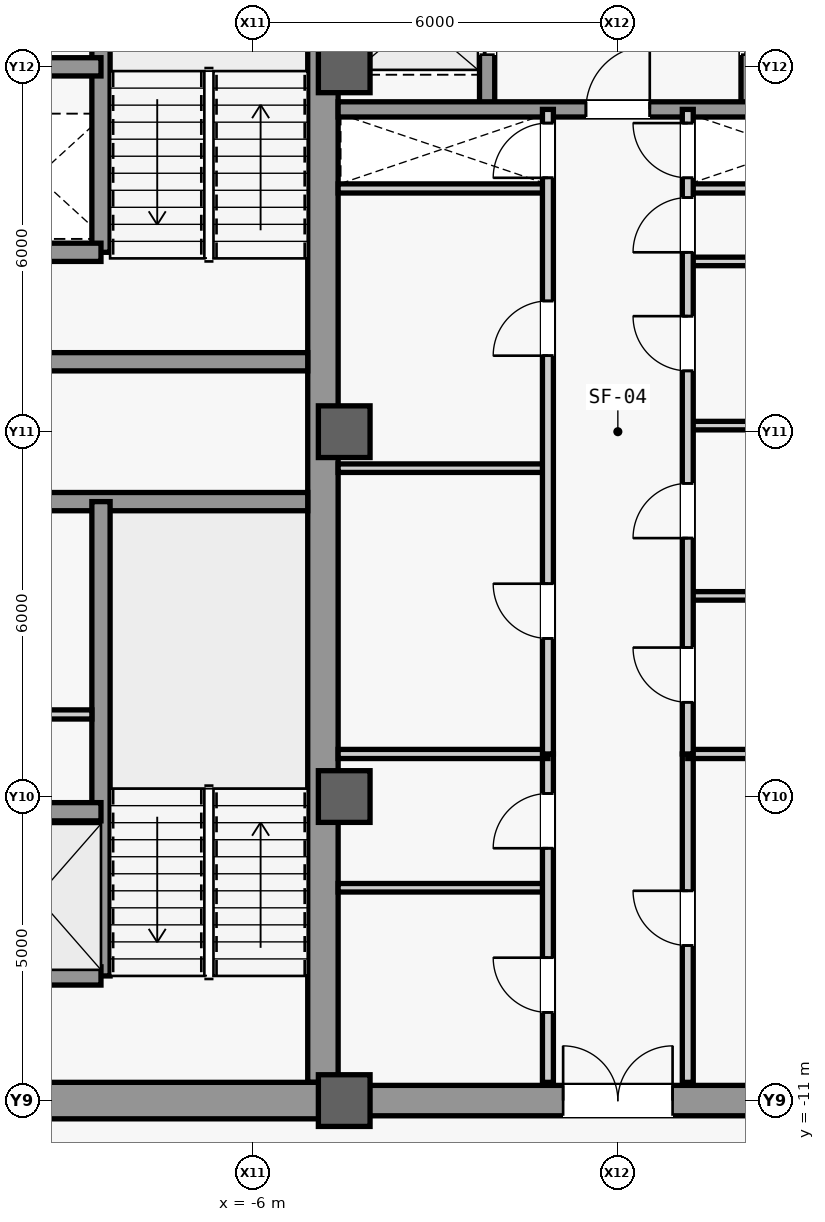
"""IFC4 building model, lengths in metres.
Left out: names, types, materials, properties, quantities, classifications, styles, units other than length and angle.
Written with IfcOpenShell. Run it as: python <this file> out.ifc"""

import sys

from ifc_helpers import new_model, si_unit, direction, frame, frame_2d, origin, origin_2d, place, context, subcontext, project, spatial, rectangle, extrude, source, transform, mapped, element, fill, save


model = new_model("IFC4")
c1 = context("Model", 3, precision=1e-05, world=origin(), true_north=direction((0.0, 1.0)))
c2 = subcontext(c1, "Body", "Model", "MODEL_VIEW")
j1 = project(units=[si_unit("LENGTHUNIT", "METRE"), si_unit("PLANEANGLEUNIT", "RADIAN")], contexts=[c1])
p1 = place(None, origin())
s1 = spatial("IfcSite", under=j1, at=p1, CompositionType="ELEMENT")
p2 = place(p1, origin())
s2 = spatial("IfcBuilding", under=s1, at=p2, CompositionType="ELEMENT")
p3 = place(p2, frame((0.0, 0.0, 247.1)))
s3 = spatial("IfcBuildingStorey", under=s2, at=p3, CompositionType="ELEMENT", Elevation=247.1)
m1 = source(origin(), c2, "Body", "SweptSolid", [
    extrude(rectangle(XDim=21.4, YDim=0.5, at=frame_2d((10.7, 0.0))), origin(), (0.0, 0.0, 1.0), 3.78),
])
p4 = place(p3, frame((-4.85, -10.7, 0.0), z_axis=(0.0, 0.0, 1.0), x_axis=(0.0, 1.0, 0.0)))
e1 = element("IfcWall", 1, at=p4, inside=s3, PredefinedType="SHEAR", context=c2, shape_type="MappedRepresentation", body=[
    mapped(m1, transform((0.0, 0.0, 0.0), scale=1.0)),
])
m2 = source(origin(), c2, "Body", "SweptSolid", [
    extrude(rectangle(XDim=5.9, YDim=0.6, at=frame_2d((2.95, 0.0))), origin(), (0.0, 0.0, 1.0), 3.78),
])
p5 = place(p3, frame((-10.75, -11.0, 0.0), z_axis=(0.0, 0.0, 1.0), x_axis=(1.0, 0.0, 0.0)))
e2 = element("IfcWall", 2, at=p5, inside=s3, PredefinedType="SHEAR", context=c2, shape_type="MappedRepresentation", body=[
    mapped(m2, transform((0.0, 0.0, 0.0), scale=1.0)),
])
m3 = source(origin(), c2, "Body", "SweptSolid", [
    extrude(rectangle(XDim=5.65, YDim=0.3, at=frame_2d((2.825, 0.0))), origin(), (0.0, 0.0, 1.0), 3.78),
])
for number, where, z_axis, x_axis in (
    (3, (-10.75, -1.15, 0.0), (0.0, 0.0, 1.0), (1.0, 0.0, 0.0)),
    (4, (-10.75, 1.15, 0.0), (0.0, 0.0, 1.0), (1.0, 0.0, 0.0)),
):
    element("IfcWall", number, at=place(p3, frame(where, z_axis=z_axis, x_axis=x_axis)), inside=s3, PredefinedType="SHEAR", context=c2, shape_type="MappedRepresentation", body=[
        mapped(m3, transform((0.0, 0.0, 0.0), scale=1.0)),
    ])
m4 = source(origin(), c2, "Body", "SweptSolid", [
    extrude(rectangle(XDim=9.2, YDim=0.5, at=frame_2d((4.6, 0.0))), origin(), (0.0, 0.0, 1.0), 3.78),
])
p6 = place(p3, frame((-4.6, -11.0, 0.0), z_axis=(0.0, 0.0, 1.0), x_axis=(1.0, 0.0, 0.0)))
e5 = element("IfcWall", 5, at=p6, inside=s3, PredefinedType="SHEAR", context=c2, shape_type="MappedRepresentation", body=[
    mapped(m4, transform((0.0, 0.0, 0.0), scale=1.0)),
])
m5 = source(origin(), c2, "Body", "SweptSolid", [
    extrude(rectangle(XDim=1.8, YDim=2.25, at=frame_2d((0.9, 1.125))), frame((0.0, 0.26, 0.0), z_axis=(0.0, -1.0, 0.0), x_axis=(1.0, 0.0, 0.0)), (0.0, 0.0, 1.0), 0.52),
])
p7 = place(p6, frame((3.7, 0.0, 0.0)))
e6 = element("IfcOpeningElement", 6, at=p7, cuts=e5, PredefinedType="OPENING", context=c2, shape_type="MappedRepresentation", body=[
    mapped(m5, transform((0.0, 0.0, 0.0), scale=1.0)),
])
m6 = source(origin(), c2, "Body", "SweptSolid", [
    extrude(rectangle(XDim=0.85, YDim=0.85, at=origin_2d()), origin(), (0.0, 0.0, 1.0), 4.0),
])
for number, where, z_axis, x_axis in (
    (7, (-4.5, -11.0, 0.0), (0.0, 0.0, 1.0), (1.0, 0.0, 0.0)),
    (8, (-4.5, -6.0, 0.0), (0.0, 0.0, 1.0), (1.0, 0.0, 0.0)),
    (9, (-4.5, 0.0, 0.0), (0.0, 0.0, 1.0), (1.0, 0.0, 0.0)),
    (10, (-4.5, 6.0, 0.0), (0.0, 0.0, 1.0), (1.0, 0.0, 0.0)),
):
    element("IfcColumn", number, at=place(p3, frame(where, z_axis=z_axis, x_axis=x_axis)), inside=s3, PredefinedType="COLUMN", context=c2, shape_type="MappedRepresentation", body=[
        mapped(m6, transform((0.0, 0.0, 0.0), scale=1.0)),
    ])
m7 = source(origin(), c2, "Body", "SweptSolid", [
    extrude(rectangle(XDim=7.8, YDim=0.3, at=frame_2d((3.9, 0.0))), origin(), (0.0, 0.0, 1.0), 3.78),
])
p8 = place(p3, frame((-8.5, -8.95, 0.0), z_axis=(0.0, 0.0, 1.0), x_axis=(0.0, 1.0, 0.0)))
e11 = element("IfcWall", 11, at=p8, inside=s3, PredefinedType="SHEAR", context=c2, shape_type="MappedRepresentation", body=[
    mapped(m7, transform((0.0, 0.0, 0.0), scale=1.0)),
])
m8 = source(origin(), c2, "Body", "SweptSolid", [
    extrude(rectangle(XDim=2.2, YDim=0.3, at=frame_2d((1.1, 0.0))), origin(), (0.0, 0.0, 1.0), 3.78),
])
for number, where, z_axis, x_axis in (
    (12, (-10.7, -8.95, 0.0), (0.0, 0.0, 1.0), (1.0, 0.0, 0.0)),
    (13, (-10.7, -6.25, 0.0), (0.0, 0.0, 1.0), (1.0, 0.0, 0.0)),
):
    element("IfcWall", number, at=place(p3, frame(where, z_axis=z_axis, x_axis=x_axis)), inside=s3, PredefinedType="SHEAR", context=c2, shape_type="MappedRepresentation", body=[
        mapped(m8, transform((0.0, 0.0, 0.0), scale=1.0)),
    ])
m9 = source(origin(), c2, "Body", "SweptSolid", [
    extrude(rectangle(XDim=7.75, YDim=0.3, at=frame_2d((3.875, 0.0))), origin(), (0.0, 0.0, 1.0), 3.78),
])
p9 = place(p3, frame((-8.5, 2.95, 0.0), z_axis=(0.0, 0.0, 1.0), x_axis=(0.0, 1.0, 0.0)))
e14 = element("IfcWall", 14, at=p9, inside=s3, PredefinedType="SHEAR", context=c2, shape_type="MappedRepresentation", body=[
    mapped(m9, transform((0.0, 0.0, 0.0), scale=1.0)),
])
for number, where, z_axis, x_axis in (
    (15, (-10.7, 2.95, 0.0), (0.0, 0.0, 1.0), (1.0, 0.0, 0.0)),
    (16, (-10.7, 6.0, 0.0), (0.0, 0.0, 1.0), (1.0, 0.0, 0.0)),
):
    element("IfcWall", number, at=place(p3, frame(where, z_axis=z_axis, x_axis=x_axis)), inside=s3, PredefinedType="SHEAR", context=c2, shape_type="MappedRepresentation", body=[
        mapped(m8, transform((0.0, 0.0, 0.0), scale=1.0)),
    ])
m10 = source(origin(), c2, "Body", "SweptSolid", [
    extrude(rectangle(XDim=2.05, YDim=0.15, at=frame_2d((1.025, 0.0))), origin(), (0.0, 0.0, 1.0), 3.78),
])
p10 = place(p3, frame((-10.7, -4.65, 0.0), z_axis=(0.0, 0.0, 1.0), x_axis=(1.0, 0.0, 0.0)))
e17 = element("IfcWall", 17, at=p10, inside=s3, PredefinedType="PARTITIONING", context=c2, shape_type="MappedRepresentation", body=[
    mapped(m10, transform((0.0, 0.0, 0.0), scale=1.0)),
])
m11 = source(origin(), c2, "Body", "SweptSolid", [
    extrude(rectangle(XDim=3.45, YDim=0.15, at=frame_2d((1.725, 0.0))), origin(), (0.0, 0.0, 1.0), 3.78),
])
for number, where, z_axis, x_axis in (
    (18, (-4.6, 4.0, 0.0), (0.0, 0.0, 1.0), (1.0, 0.0, 0.0)),
    (19, (1.15, 4.0, 0.0), (0.0, 0.0, 1.0), (1.0, 0.0, 0.0)),
):
    element("IfcWall", number, at=place(p3, frame(where, z_axis=z_axis, x_axis=x_axis)), inside=s3, PredefinedType="PARTITIONING", context=c2, shape_type="MappedRepresentation", body=[
        mapped(m11, transform((0.0, 0.0, 0.0), scale=1.0)),
    ])
m12 = source(origin(), c2, "Body", "SweptSolid", [
    extrude(rectangle(XDim=3.45, YDim=0.14, at=frame_2d((1.725, 0.0))), origin(), (0.0, 0.0, 1.0), 3.78),
])
p11 = place(p3, frame((-4.6, -7.5, 0.0), z_axis=(0.0, 0.0, 1.0), x_axis=(1.0, 0.0, 0.0)))
e20 = element("IfcWall", 20, at=p11, inside=s3, PredefinedType="PARTITIONING", context=c2, shape_type="MappedRepresentation", body=[
    mapped(m12, transform((0.0, 0.0, 0.0), scale=1.0)),
])
m13 = source(origin(), c2, "Body", "SweptSolid", [
    extrude(rectangle(XDim=5.4, YDim=0.18, at=frame_2d((2.7, 0.0))), origin(), (0.0, 0.0, 1.0), 3.78),
])
p12 = place(p3, frame((-1.15, -10.7, 0.0), z_axis=(0.0, 0.0, 1.0), x_axis=(0.0, 1.0, 0.0)))
e21 = element("IfcWall", 21, at=p12, inside=s3, PredefinedType="PARTITIONING", context=c2, shape_type="MappedRepresentation", body=[
    mapped(m13, transform((0.0, 0.0, 0.0), scale=1.0)),
])
m14 = source(origin(), c2, "Body", "SweptSolid", [
    extrude(rectangle(XDim=0.9, YDim=2.15, at=frame_2d((0.45, 1.075))), frame((0.0, 0.1, 0.0), z_axis=(0.0, -1.0, 0.0), x_axis=(1.0, 0.0, 0.0)), (0.0, 0.0, 1.0), 0.2),
])
p13 = place(p12, frame((1.15, 0.0, 0.0)))
e22 = element("IfcOpeningElement", 22, at=p13, cuts=e21, PredefinedType="OPENING", context=c2, shape_type="MappedRepresentation", body=[
    mapped(m14, transform((0.0, 0.0, 0.0), scale=1.0)),
])
p14 = place(p12, frame((3.85, 0.0, 0.0)))
e23 = element("IfcOpeningElement", 23, at=p14, cuts=e21, PredefinedType="OPENING", context=c2, shape_type="MappedRepresentation", body=[
    mapped(m14, transform((0.0, 0.0, 0.0), scale=1.0)),
])
p15 = place(p3, frame((1.15, -10.7, 0.0), z_axis=(0.0, 0.0, 1.0), x_axis=(0.0, 1.0, 0.0)))
e24 = element("IfcWall", 24, at=p15, inside=s3, PredefinedType="PARTITIONING", context=c2, shape_type="MappedRepresentation", body=[
    mapped(m13, transform((0.0, 0.0, 0.0), scale=1.0)),
])
p16 = place(p15, frame((2.25, 0.0, 0.0)))
e25 = element("IfcOpeningElement", 25, at=p16, cuts=e24, PredefinedType="OPENING", context=c2, shape_type="MappedRepresentation", body=[
    mapped(m14, transform((0.0, 0.0, 0.0), scale=1.0)),
])
for number, where, z_axis, x_axis in (
    (26, (-4.6, -5.3, 0.0), (0.0, 0.0, 1.0), (1.0, 0.0, 0.0)),
    (27, (1.15, -5.3, 0.0), (0.0, 0.0, 1.0), (1.0, 0.0, 0.0)),
):
    element("IfcWall", number, at=place(p3, frame(where, z_axis=z_axis, x_axis=x_axis)), inside=s3, PredefinedType="PARTITIONING", context=c2, shape_type="MappedRepresentation", body=[
        mapped(m11, transform((0.0, 0.0, 0.0), scale=1.0)),
    ])
m15 = source(origin(), c2, "Body", "SweptSolid", [
    extrude(rectangle(XDim=5.4, YDim=0.25, at=frame_2d((2.7, 0.0))), origin(), (0.0, 0.0, 1.0), 3.78),
])
p17 = place(p3, frame((-2.15, 5.3, 0.0), z_axis=(0.0, 0.0, 1.0), x_axis=(0.0, 1.0, 0.0)))
e28 = element("IfcWall", 28, at=p17, inside=s3, PredefinedType="SHEAR", context=c2, shape_type="MappedRepresentation", body=[
    mapped(m15, transform((0.0, 0.0, 0.0), scale=1.0)),
])
m16 = source(origin(), c2, "Body", "SweptSolid", [
    extrude(rectangle(XDim=1.2, YDim=2.3, at=frame_2d((0.6, 1.15))), frame((0.0, 0.135, 0.0), z_axis=(0.0, -1.0, 0.0), x_axis=(1.0, 0.0, 0.0)), (0.0, 0.0, 1.0), 0.27),
])
p18 = place(p17, frame((3.3, 0.0, 0.0)))
e29 = element("IfcOpeningElement", 29, at=p18, cuts=e28, PredefinedType="OPENING", context=c2, shape_type="MappedRepresentation", body=[
    mapped(m16, transform((0.0, 0.0, 0.0), scale=1.0)),
])
p19 = place(p17, frame((0.9, 0.0, 0.0)))
e30 = element("IfcOpeningElement", 30, at=p19, cuts=e28, PredefinedType="OPENING", context=c2, shape_type="MappedRepresentation", body=[
    mapped(m16, transform((0.0, 0.0, 0.0), scale=1.0)),
])
p20 = place(p3, frame((2.15, 5.3, 0.0), z_axis=(0.0, 0.0, 1.0), x_axis=(0.0, 1.0, 0.0)))
e31 = element("IfcWall", 31, at=p20, inside=s3, PredefinedType="SHEAR", context=c2, shape_type="MappedRepresentation", body=[
    mapped(m15, transform((0.0, 0.0, 0.0), scale=1.0)),
])
p21 = place(p20, frame((3.3, 0.0, 0.0)))
e32 = element("IfcOpeningElement", 32, at=p21, cuts=e31, PredefinedType="OPENING", context=c2, shape_type="MappedRepresentation", body=[
    mapped(m16, transform((0.0, 0.0, 0.0), scale=1.0)),
])
p22 = place(p20, frame((0.9, 0.0, 0.0)))
e33 = element("IfcOpeningElement", 33, at=p22, cuts=e31, PredefinedType="OPENING", context=c2, shape_type="MappedRepresentation", body=[
    mapped(m16, transform((0.0, 0.0, 0.0), scale=1.0)),
])
m17 = source(origin(), c2, "Body", "SweptSolid", [
    extrude(rectangle(XDim=9.2, YDim=0.25, at=frame_2d((4.6, 0.0))), origin(), (0.0, 0.0, 1.0), 3.78),
])
p23 = place(p3, frame((-4.6, 5.3, 0.0), z_axis=(0.0, 0.0, 1.0), x_axis=(1.0, 0.0, 0.0)))
e34 = element("IfcWall", 34, at=p23, inside=s3, PredefinedType="SHEAR", context=c2, shape_type="MappedRepresentation", body=[
    mapped(m17, transform((0.0, 0.0, 0.0), scale=1.0)),
])
m18 = source(origin(), c2, "Body", "SweptSolid", [
    extrude(rectangle(XDim=1.05, YDim=2.2, at=frame_2d((0.525, 1.1))), frame((0.0, 0.135, 0.0), z_axis=(0.0, -1.0, 0.0), x_axis=(1.0, 0.0, 0.0)), (0.0, 0.0, 1.0), 0.27),
])
p24 = place(p23, frame((4.075, 0.0, 0.0)))
e35 = element("IfcOpeningElement", 35, at=p24, cuts=e34, PredefinedType="OPENING", context=c2, shape_type="MappedRepresentation", body=[
    mapped(m18, transform((0.0, 0.0, 0.0), scale=1.0)),
])
p25 = place(p3, frame((-4.6, -0.6, 0.0), z_axis=(0.0, 0.0, 1.0), x_axis=(1.0, 0.0, 0.0)))
e36 = element("IfcWall", 36, at=p25, inside=s3, PredefinedType="PARTITIONING", context=c2, shape_type="MappedRepresentation", body=[
    mapped(m12, transform((0.0, 0.0, 0.0), scale=1.0)),
])
m19 = source(origin(), c2, "Body", "SweptSolid", [
    extrude(rectangle(XDim=10.6, YDim=0.18, at=frame_2d((5.3, 0.0))), origin(), (0.0, 0.0, 1.0), 3.78),
])
p26 = place(p3, frame((-1.15, -5.3, 0.0), z_axis=(0.0, 0.0, 1.0), x_axis=(0.0, 1.0, 0.0)))
e37 = element("IfcWall", 37, at=p26, inside=s3, PredefinedType="PARTITIONING", context=c2, shape_type="MappedRepresentation", body=[
    mapped(m19, transform((0.0, 0.0, 0.0), scale=1.0)),
])
p27 = place(p26, frame((1.9, 0.0, 0.0)))
e38 = element("IfcOpeningElement", 38, at=p27, cuts=e37, PredefinedType="OPENING", context=c2, shape_type="MappedRepresentation", body=[
    mapped(m14, transform((0.0, 0.0, 0.0), scale=1.0)),
])
p28 = place(p26, frame((6.55, 0.0, 0.0)))
e39 = element("IfcOpeningElement", 39, at=p28, cuts=e37, PredefinedType="OPENING", context=c2, shape_type="MappedRepresentation", body=[
    mapped(m14, transform((0.0, 0.0, 0.0), scale=1.0)),
])
p29 = place(p26, frame((9.475, 0.0, 0.0)))
e40 = element("IfcOpeningElement", 40, at=p29, cuts=e37, PredefinedType="OPENING", context=c2, shape_type="MappedRepresentation", body=[
    mapped(m14, transform((0.0, 0.0, 0.0), scale=1.0)),
])
p30 = place(p3, frame((1.15, -2.7, 0.0), z_axis=(0.0, 0.0, 1.0), x_axis=(1.0, 0.0, 0.0)))
e41 = element("IfcWall", 41, at=p30, inside=s3, PredefinedType="PARTITIONING", context=c2, shape_type="MappedRepresentation", body=[
    mapped(m12, transform((0.0, 0.0, 0.0), scale=1.0)),
])
m20 = source(origin(), c2, "Body", "SweptSolid", [
    extrude(rectangle(XDim=3.45, YDim=0.14, at=frame_2d((1.725, 0.0))), origin(), (0.0, 0.0, 1.0), 3.085),
])
p31 = place(p3, frame((1.15, 0.1, 0.0), z_axis=(0.0, 0.0, 1.0), x_axis=(1.0, 0.0, 0.0)))
e42 = element("IfcWall", 42, at=p31, inside=s3, PredefinedType="PARTITIONING", context=c2, shape_type="MappedRepresentation", body=[
    mapped(m20, transform((0.0, 0.0, 0.0), scale=1.0)),
])
p32 = place(p3, frame((1.15, 2.8, 0.0), z_axis=(0.0, 0.0, 1.0), x_axis=(1.0, 0.0, 0.0)))
e43 = element("IfcWall", 43, at=p32, inside=s3, PredefinedType="PARTITIONING", context=c2, shape_type="MappedRepresentation", body=[
    mapped(m12, transform((0.0, 0.0, 0.0), scale=1.0)),
])
p33 = place(p3, frame((1.15, -5.3, 0.0), z_axis=(0.0, 0.0, 1.0), x_axis=(0.0, 1.0, 0.0)))
e44 = element("IfcWall", 44, at=p33, inside=s3, PredefinedType="PARTITIONING", context=c2, shape_type="MappedRepresentation", body=[
    mapped(m19, transform((0.0, 0.0, 0.0), scale=1.0)),
])
p34 = place(p33, frame((0.85, 0.0, 0.0)))
e45 = element("IfcOpeningElement", 45, at=p34, cuts=e44, PredefinedType="OPENING", context=c2, shape_type="MappedRepresentation", body=[
    mapped(m14, transform((0.0, 0.0, 0.0), scale=1.0)),
])
p35 = place(p33, frame((3.55, 0.0, 0.0)))
e46 = element("IfcOpeningElement", 46, at=p35, cuts=e44, PredefinedType="OPENING", context=c2, shape_type="MappedRepresentation", body=[
    mapped(m14, transform((0.0, 0.0, 0.0), scale=1.0)),
])
p36 = place(p33, frame((6.3, 0.0, 0.0)))
e47 = element("IfcOpeningElement", 47, at=p36, cuts=e44, PredefinedType="OPENING", context=c2, shape_type="MappedRepresentation", body=[
    mapped(m14, transform((0.0, 0.0, 0.0), scale=1.0)),
])
p37 = place(p33, frame((8.25, 0.0, 0.0)))
e48 = element("IfcOpeningElement", 48, at=p37, cuts=e44, PredefinedType="OPENING", context=c2, shape_type="MappedRepresentation", body=[
    mapped(m14, transform((0.0, 0.0, 0.0), scale=1.0)),
])
p38 = place(p33, frame((9.475, 0.0, 0.0)))
e49 = element("IfcOpeningElement", 49, at=p38, cuts=e44, PredefinedType="OPENING", context=c2, shape_type="MappedRepresentation", body=[
    mapped(m14, transform((0.0, 0.0, 0.0), scale=1.0)),
])
m21 = source(origin(), c2, "Body", "SweptSolid", [
    extrude(rectangle(XDim=0.9, YDim=2.15, at=frame_2d((0.45, 1.075))), frame((0.0, 0.025, 0.0), z_axis=(0.0, -1.0, 0.0), x_axis=(1.0, 0.0, 0.0)), (0.0, 0.0, 1.0), 0.05),
])
p39 = place(p13, origin())
e50 = element("IfcDoor", 50, at=p39, inside=s3, OperationType="SINGLE_SWING_RIGHT", PredefinedType="DOOR", context=c2, shape_type="MappedRepresentation", body=[
    mapped(m21, transform((0.0, 0.0, 0.0), scale=1.0)),
])
fill(e22, e50)
p40 = place(p14, origin())
e51 = element("IfcDoor", 51, at=p40, inside=s3, OperationType="SINGLE_SWING_LEFT", PredefinedType="DOOR", context=c2, shape_type="MappedRepresentation", body=[
    mapped(m21, transform((0.0, 0.0, 0.0), scale=1.0)),
])
fill(e23, e51)
p41 = place(p16, origin())
e52 = element("IfcDoor", 52, at=p41, inside=s3, OperationType="SINGLE_SWING_RIGHT", PredefinedType="DOOR", context=c2, shape_type="MappedRepresentation", body=[
    mapped(m21, transform((0.0, 0.0, 0.0), scale=1.0)),
])
fill(e25, e52)
m22 = source(origin(), c2, "Body", "SweptSolid", [
    extrude(rectangle(XDim=1.8, YDim=2.25, at=frame_2d((0.9, 1.125))), frame((0.0, 0.025, 0.0), z_axis=(0.0, -1.0, 0.0), x_axis=(1.0, 0.0, 0.0)), (0.0, 0.0, 1.0), 0.05),
])
p42 = place(p7, origin())
e53 = element("IfcDoor", 53, at=p42, inside=s3, OperationType="SINGLE_SWING_LEFT", PredefinedType="DOOR", context=c2, shape_type="MappedRepresentation", body=[
    mapped(m22, transform((0.0, 0.0, 0.0), scale=1.0)),
])
fill(e6, e53)
m23 = source(origin(), c2, "Body", "SweptSolid", [
    extrude(rectangle(XDim=1.05, YDim=2.2, at=frame_2d((0.525, 1.1))), frame((0.0, 0.025, 0.0), z_axis=(0.0, -1.0, 0.0), x_axis=(1.0, 0.0, 0.0)), (0.0, 0.0, 1.0), 0.05),
])
p43 = place(p24, origin())
e54 = element("IfcDoor", 54, at=p43, inside=s3, OperationType="SINGLE_SWING_RIGHT", PredefinedType="DOOR", context=c2, shape_type="MappedRepresentation", body=[
    mapped(m23, transform((0.0, 0.0, 0.0), scale=1.0)),
])
fill(e35, e54)
p44 = place(p27, origin())
e55 = element("IfcDoor", 55, at=p44, inside=s3, OperationType="SINGLE_SWING_RIGHT", PredefinedType="DOOR", context=c2, shape_type="MappedRepresentation", body=[
    mapped(m21, transform((0.0, 0.0, 0.0), scale=1.0)),
])
fill(e38, e55)
p45 = place(p28, origin())
e56 = element("IfcDoor", 56, at=p45, inside=s3, OperationType="SINGLE_SWING_LEFT", PredefinedType="DOOR", context=c2, shape_type="MappedRepresentation", body=[
    mapped(m21, transform((0.0, 0.0, 0.0), scale=1.0)),
])
fill(e39, e56)
p46 = place(p34, origin())
e57 = element("IfcDoor", 57, at=p46, inside=s3, OperationType="SINGLE_SWING_RIGHT", PredefinedType="DOOR", context=c2, shape_type="MappedRepresentation", body=[
    mapped(m21, transform((0.0, 0.0, 0.0), scale=1.0)),
])
fill(e45, e57)
p47 = place(p35, origin())
e58 = element("IfcDoor", 58, at=p47, inside=s3, OperationType="SINGLE_SWING_LEFT", PredefinedType="DOOR", context=c2, shape_type="MappedRepresentation", body=[
    mapped(m21, transform((0.0, 0.0, 0.0), scale=1.0)),
])
fill(e46, e58)
p48 = place(p36, origin())
e59 = element("IfcDoor", 59, at=p48, inside=s3, OperationType="SINGLE_SWING_RIGHT", PredefinedType="DOOR", context=c2, shape_type="MappedRepresentation", body=[
    mapped(m21, transform((0.0, 0.0, 0.0), scale=1.0)),
])
fill(e47, e59)
p49 = place(p37, origin())
e60 = element("IfcDoor", 60, at=p49, inside=s3, OperationType="SINGLE_SWING_LEFT", PredefinedType="DOOR", context=c2, shape_type="MappedRepresentation", body=[
    mapped(m21, transform((0.0, 0.0, 0.0), scale=1.0)),
])
fill(e48, e60)
p50 = place(p29, origin())
e61 = element("IfcDoor", 61, at=p50, inside=s3, OperationType="SINGLE_SWING_LEFT", PredefinedType="DOOR", context=c2, shape_type="MappedRepresentation", body=[
    mapped(m21, transform((0.0, 0.0, 0.0), scale=1.0)),
])
fill(e40, e61)
p51 = place(p38, origin())
e62 = element("IfcDoor", 62, at=p51, inside=s3, OperationType="SINGLE_SWING_RIGHT", PredefinedType="DOOR", context=c2, shape_type="MappedRepresentation", body=[
    mapped(m21, transform((0.0, 0.0, 0.0), scale=1.0)),
])
fill(e49, e62)
m24 = source(origin(), c2, "Body", "SweptSolid", [
    extrude(rectangle(XDim=1.2, YDim=2.3, at=frame_2d((0.6, 1.15))), frame((0.0, 0.025, 0.0), z_axis=(0.0, -1.0, 0.0), x_axis=(1.0, 0.0, 0.0)), (0.0, 0.0, 1.0), 0.05),
])
p52 = place(p19, origin())
e63 = element("IfcDoor", 63, at=p52, inside=s3, OperationType="SLIDING_TO_LEFT", PredefinedType="DOOR", context=c2, shape_type="MappedRepresentation", body=[
    mapped(m24, transform((0.0, 0.0, 0.0), scale=1.0)),
])
fill(e30, e63)
save(model, sys.argv[1])
